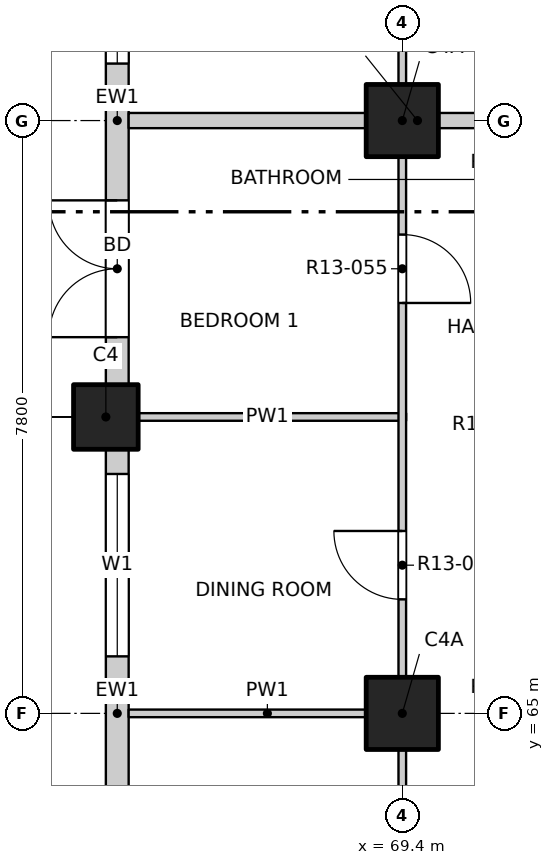
"""IFC4 building model, lengths in metres.
Left out: names, types, materials, properties, quantities, classifications, styles, units other than length and angle.
Written with IfcOpenShell. Run it as: python <this file> out.ifc"""

import sys

from ifc_helpers import new_model, si_unit, direction, frame, frame_2d, origin, origin_2d, place, context, subcontext, project, spatial, rectangle, extrude, element, fill, save


model = new_model("IFC4")
c1 = context("Model", 3, precision=1e-05, world=origin(), true_north=direction((0.0, 1.0)))
c2 = subcontext(c1, "Body", "Model", "MODEL_VIEW")
j1 = project(units=[si_unit("LENGTHUNIT", "METRE"), si_unit("PLANEANGLEUNIT", "RADIAN")], contexts=[c1])
p1 = place(None, origin())
s1 = spatial("IfcSite", under=j1, at=p1, CompositionType="ELEMENT")
p2 = place(p1, origin())
s2 = spatial("IfcBuilding", under=s1, at=p2, CompositionType="ELEMENT")
p3 = place(p2, frame((0.0, 0.0, 140.7)))
s3 = spatial("IfcBuildingStorey", under=s2, at=p3, CompositionType="ELEMENT", Elevation=140.7)
p4 = place(p3, frame((65.5, 68.9, -0.25), z_axis=(0.0, 0.0, 1.0), x_axis=(1.0, 0.0, 0.0)))
e1 = element("IfcColumn", 1, at=p4, inside=s3, PredefinedType="COLUMN", context=c2, shape_type="SweptSolid", body=[
    extrude(rectangle(XDim=0.85, YDim=0.85, at=origin_2d()), origin(), (0.0, 0.0, 1.0), 3.35),
])
for number, where, z_axis, x_axis in (
    (2, (69.4, 65.0, -0.25), (0.0, 0.0, 1.0), (1.0, 0.0, 0.0)),
    (3, (69.4, 72.8, -0.25), (0.0, 0.0, 1.0), (1.0, 0.0, 0.0)),
):
    element("IfcColumn", number, at=place(p3, frame(where, z_axis=z_axis, x_axis=x_axis)), inside=s3, PredefinedType="COLUMN", context=c2, shape_type="SweptSolid", body=[
        extrude(rectangle(XDim=0.95, YDim=0.95, at=origin_2d()), origin(), (0.0, 0.0, 1.0), 3.35),
    ])
p5 = place(p3, frame((65.65, 61.525, 0.0), z_axis=(0.0, 0.0, 1.0), x_axis=(0.0, 1.0, 0.0)))
e4 = element("IfcWall", 4, at=p5, inside=s3, PredefinedType="SOLIDWALL", context=c2, shape_type="SweptSolid", body=[
    extrude(rectangle(XDim=6.95, YDim=0.3, at=frame_2d((3.475, 0.0))), origin(), (0.0, 0.0, 1.0), 3.1),
])
p6 = place(p5, frame((0.625, 0.0, 0.0)))
e5 = element("IfcOpeningElement", 5, at=p6, cuts=e4, PredefinedType="OPENING", context=c2, shape_type="SweptSolid", body=[
    extrude(rectangle(XDim=1.8, YDim=2.4, at=frame_2d((0.9, 1.2))), frame((0.0, 0.16, 0.0), z_axis=(0.0, -1.0, 0.0), x_axis=(1.0, 0.0, 0.0)), (0.0, 0.0, 1.0), 0.32),
])
p7 = place(p5, frame((4.225, 0.0, 0.9)))
e6 = element("IfcOpeningElement", 6, at=p7, cuts=e4, PredefinedType="OPENING", context=c2, shape_type="SweptSolid", body=[
    extrude(rectangle(XDim=2.4, YDim=1.8, at=frame_2d((1.2, 0.9))), frame((0.0, 0.16, 0.0), z_axis=(0.0, -1.0, 0.0), x_axis=(1.0, 0.0, 0.0)), (0.0, 0.0, 1.0), 0.32),
])
p8 = place(p3, frame((65.65, 69.325, 0.0), z_axis=(0.0, 0.0, 1.0), x_axis=(0.0, 1.0, 0.0)))
e7 = element("IfcWall", 7, at=p8, inside=s3, PredefinedType="SOLIDWALL", context=c2, shape_type="SweptSolid", body=[
    extrude(rectangle(XDim=6.95, YDim=0.3, at=frame_2d((3.475, 0.0))), origin(), (0.0, 0.0, 1.0), 3.1),
])
p9 = place(p8, frame((0.625, 0.0, 0.0)))
e8 = element("IfcOpeningElement", 8, at=p9, cuts=e7, PredefinedType="OPENING", context=c2, shape_type="SweptSolid", body=[
    extrude(rectangle(XDim=1.8, YDim=2.4, at=frame_2d((0.9, 1.2))), frame((0.0, 0.16, 0.0), z_axis=(0.0, -1.0, 0.0), x_axis=(1.0, 0.0, 0.0)), (0.0, 0.0, 1.0), 0.32),
])
p10 = place(p8, frame((4.225, 0.0, 0.9)))
e9 = element("IfcOpeningElement", 9, at=p10, cuts=e7, PredefinedType="OPENING", context=c2, shape_type="SweptSolid", body=[
    extrude(rectangle(XDim=2.4, YDim=1.8, at=frame_2d((1.2, 0.9))), frame((0.0, 0.16, 0.0), z_axis=(0.0, -1.0, 0.0), x_axis=(1.0, 0.0, 0.0)), (0.0, 0.0, 1.0), 0.32),
])
for number, where, z_axis, x_axis in (
    (10, (65.8, 65.0, 0.0), (0.0, 0.0, 1.0), (1.0, 0.0, 0.0)),
    (11, (65.8, 68.9, 0.0), (0.0, 0.0, 1.0), (1.0, 0.0, 0.0)),
):
    element("IfcWall", number, at=place(p3, frame(where, z_axis=z_axis, x_axis=x_axis)), inside=s3, PredefinedType="PARTITIONING", context=c2, shape_type="SweptSolid", body=[
        extrude(rectangle(XDim=3.65, YDim=0.1, at=frame_2d((1.825, 0.0))), origin(), (0.0, 0.0, 1.0), 3.1),
    ])
p11 = place(p3, frame((65.8, 72.8, 0.0), z_axis=(0.0, 0.0, 1.0), x_axis=(1.0, 0.0, 0.0)))
e12 = element("IfcWall", 12, at=p11, inside=s3, PredefinedType="PARTITIONING", context=c2, shape_type="SweptSolid", body=[
    extrude(rectangle(XDim=7.6, YDim=0.2, at=frame_2d((3.8, 0.0))), origin(), (0.0, 0.0, 1.0), 3.1),
])
p12 = place(p3, frame((69.4, 45.8, 0.0), z_axis=(0.0, 0.0, 1.0), x_axis=(0.0, 1.0, 0.0)))
e13 = element("IfcWall", 13, at=p12, inside=s3, PredefinedType="PARTITIONING", context=c2, shape_type="SweptSolid", body=[
    extrude(rectangle(XDim=38.4, YDim=0.1, at=frame_2d((19.2, 0.0))), origin(), (0.0, 0.0, 1.0), 3.1),
])
p13 = place(p12, frame((1.05, 0.0, 0.0)))
e14 = element("IfcOpeningElement", 14, at=p13, cuts=e13, PredefinedType="OPENING", context=c2, shape_type="SweptSolid", body=[
    extrude(rectangle(XDim=1.2, YDim=2.1, at=frame_2d((0.6, 1.05))), frame((0.0, 0.06, 0.0), z_axis=(0.0, -1.0, 0.0), x_axis=(1.0, 0.0, 0.0)), (0.0, 0.0, 1.0), 0.12),
])
p14 = place(p12, frame((5.1, 0.0, 0.0)))
e15 = element("IfcOpeningElement", 15, at=p14, cuts=e13, PredefinedType="OPENING", context=c2, shape_type="SweptSolid", body=[
    extrude(rectangle(XDim=0.9, YDim=2.1, at=frame_2d((0.45, 1.05))), frame((0.0, 0.06, 0.0), z_axis=(0.0, -1.0, 0.0), x_axis=(1.0, 0.0, 0.0)), (0.0, 0.0, 1.0), 0.12),
])
p15 = place(p12, frame((9.0, 0.0, 0.0)))
e16 = element("IfcOpeningElement", 16, at=p15, cuts=e13, PredefinedType="OPENING", context=c2, shape_type="SweptSolid", body=[
    extrude(rectangle(XDim=0.9, YDim=2.1, at=frame_2d((0.45, 1.05))), frame((0.0, 0.06, 0.0), z_axis=(0.0, -1.0, 0.0), x_axis=(1.0, 0.0, 0.0)), (0.0, 0.0, 1.0), 0.12),
])
p16 = place(p12, frame((12.9, 0.0, 0.0)))
e17 = element("IfcOpeningElement", 17, at=p16, cuts=e13, PredefinedType="OPENING", context=c2, shape_type="SweptSolid", body=[
    extrude(rectangle(XDim=0.9, YDim=2.1, at=frame_2d((0.45, 1.05))), frame((0.0, 0.06, 0.0), z_axis=(0.0, -1.0, 0.0), x_axis=(1.0, 0.0, 0.0)), (0.0, 0.0, 1.0), 0.12),
])
p17 = place(p12, frame((16.8, 0.0, 0.0)))
e18 = element("IfcOpeningElement", 18, at=p17, cuts=e13, PredefinedType="OPENING", context=c2, shape_type="SweptSolid", body=[
    extrude(rectangle(XDim=0.9, YDim=2.1, at=frame_2d((0.45, 1.05))), frame((0.0, 0.06, 0.0), z_axis=(0.0, -1.0, 0.0), x_axis=(1.0, 0.0, 0.0)), (0.0, 0.0, 1.0), 0.12),
])
p18 = place(p12, frame((20.7, 0.0, 0.0)))
e19 = element("IfcOpeningElement", 19, at=p18, cuts=e13, PredefinedType="OPENING", context=c2, shape_type="SweptSolid", body=[
    extrude(rectangle(XDim=0.9, YDim=2.1, at=frame_2d((0.45, 1.05))), frame((0.0, 0.06, 0.0), z_axis=(0.0, -1.0, 0.0), x_axis=(1.0, 0.0, 0.0)), (0.0, 0.0, 1.0), 0.12),
])
p19 = place(p12, frame((24.6, 0.0, 0.0)))
e20 = element("IfcOpeningElement", 20, at=p19, cuts=e13, PredefinedType="OPENING", context=c2, shape_type="SweptSolid", body=[
    extrude(rectangle(XDim=0.9, YDim=2.1, at=frame_2d((0.45, 1.05))), frame((0.0, 0.06, 0.0), z_axis=(0.0, -1.0, 0.0), x_axis=(1.0, 0.0, 0.0)), (0.0, 0.0, 1.0), 0.12),
])
p20 = place(p12, frame((30.3, 0.0, 0.0)))
e21 = element("IfcOpeningElement", 21, at=p20, cuts=e13, PredefinedType="OPENING", context=c2, shape_type="SweptSolid", body=[
    extrude(rectangle(XDim=1.2, YDim=2.1, at=frame_2d((0.6, 1.05))), frame((0.0, 0.06, 0.0), z_axis=(0.0, -1.0, 0.0), x_axis=(1.0, 0.0, 0.0)), (0.0, 0.0, 1.0), 0.12),
])
p21 = place(p12, frame((36.15, 0.0, 0.0)))
e22 = element("IfcOpeningElement", 22, at=p21, cuts=e13, PredefinedType="OPENING", context=c2, shape_type="SweptSolid", body=[
    extrude(rectangle(XDim=1.2, YDim=2.1, at=frame_2d((0.6, 1.05))), frame((0.0, 0.06, 0.0), z_axis=(0.0, -1.0, 0.0), x_axis=(1.0, 0.0, 0.0)), (0.0, 0.0, 1.0), 0.12),
])
p22 = place(p7, origin())
e23 = element("IfcWindow", 23, at=p22, inside=s3, PartitioningType="DOUBLE_PANEL_VERTICAL", PredefinedType="WINDOW", context=c2, shape_type="SweptSolid", body=[
    extrude(rectangle(XDim=2.4, YDim=1.8, at=frame_2d((1.2, 0.9))), frame((0.0, 0.03, 0.0), z_axis=(0.0, -1.0, 0.0), x_axis=(1.0, 0.0, 0.0)), (0.0, 0.0, 1.0), 0.06),
])
fill(e6, e23)
p23 = place(p9, origin())
e24 = element("IfcDoor", 24, at=p23, inside=s3, OperationType="DOUBLE_DOOR_SINGLE_SWING", PredefinedType="DOOR", context=c2, shape_type="SweptSolid", body=[
    extrude(rectangle(XDim=1.8, YDim=2.4, at=frame_2d((0.9, 1.2))), frame((0.0, 0.025, 0.0), z_axis=(0.0, -1.0, 0.0), x_axis=(1.0, 0.0, 0.0)), (0.0, 0.0, 1.0), 0.05),
])
fill(e8, e24)
p24 = place(p10, origin())
e25 = element("IfcWindow", 25, at=p24, inside=s3, PartitioningType="DOUBLE_PANEL_VERTICAL", PredefinedType="WINDOW", context=c2, shape_type="SweptSolid", body=[
    extrude(rectangle(XDim=2.4, YDim=1.8, at=frame_2d((1.2, 0.9))), frame((0.0, 0.03, 0.0), z_axis=(0.0, -1.0, 0.0), x_axis=(1.0, 0.0, 0.0)), (0.0, 0.0, 1.0), 0.06),
])
fill(e9, e25)
p25 = place(p18, origin())
e26 = element("IfcDoor", 26, at=p25, inside=s3, OperationType="SINGLE_SWING_RIGHT", PredefinedType="DOOR", context=c2, shape_type="SweptSolid", body=[
    extrude(rectangle(XDim=0.9, YDim=2.1, at=frame_2d((0.45, 1.05))), frame((0.0, 0.025, 0.0), z_axis=(0.0, -1.0, 0.0), x_axis=(1.0, 0.0, 0.0)), (0.0, 0.0, 1.0), 0.05),
])
fill(e19, e26)
p26 = place(p19, origin())
e27 = element("IfcDoor", 27, at=p26, inside=s3, OperationType="SINGLE_SWING_RIGHT", PredefinedType="DOOR", context=c2, shape_type="SweptSolid", body=[
    extrude(rectangle(XDim=0.9, YDim=2.1, at=frame_2d((0.45, 1.05))), frame((0.0, 0.025, 0.0), z_axis=(0.0, -1.0, 0.0), x_axis=(1.0, 0.0, 0.0)), (0.0, 0.0, 1.0), 0.05),
])
fill(e20, e27)
save(model, sys.argv[1])
